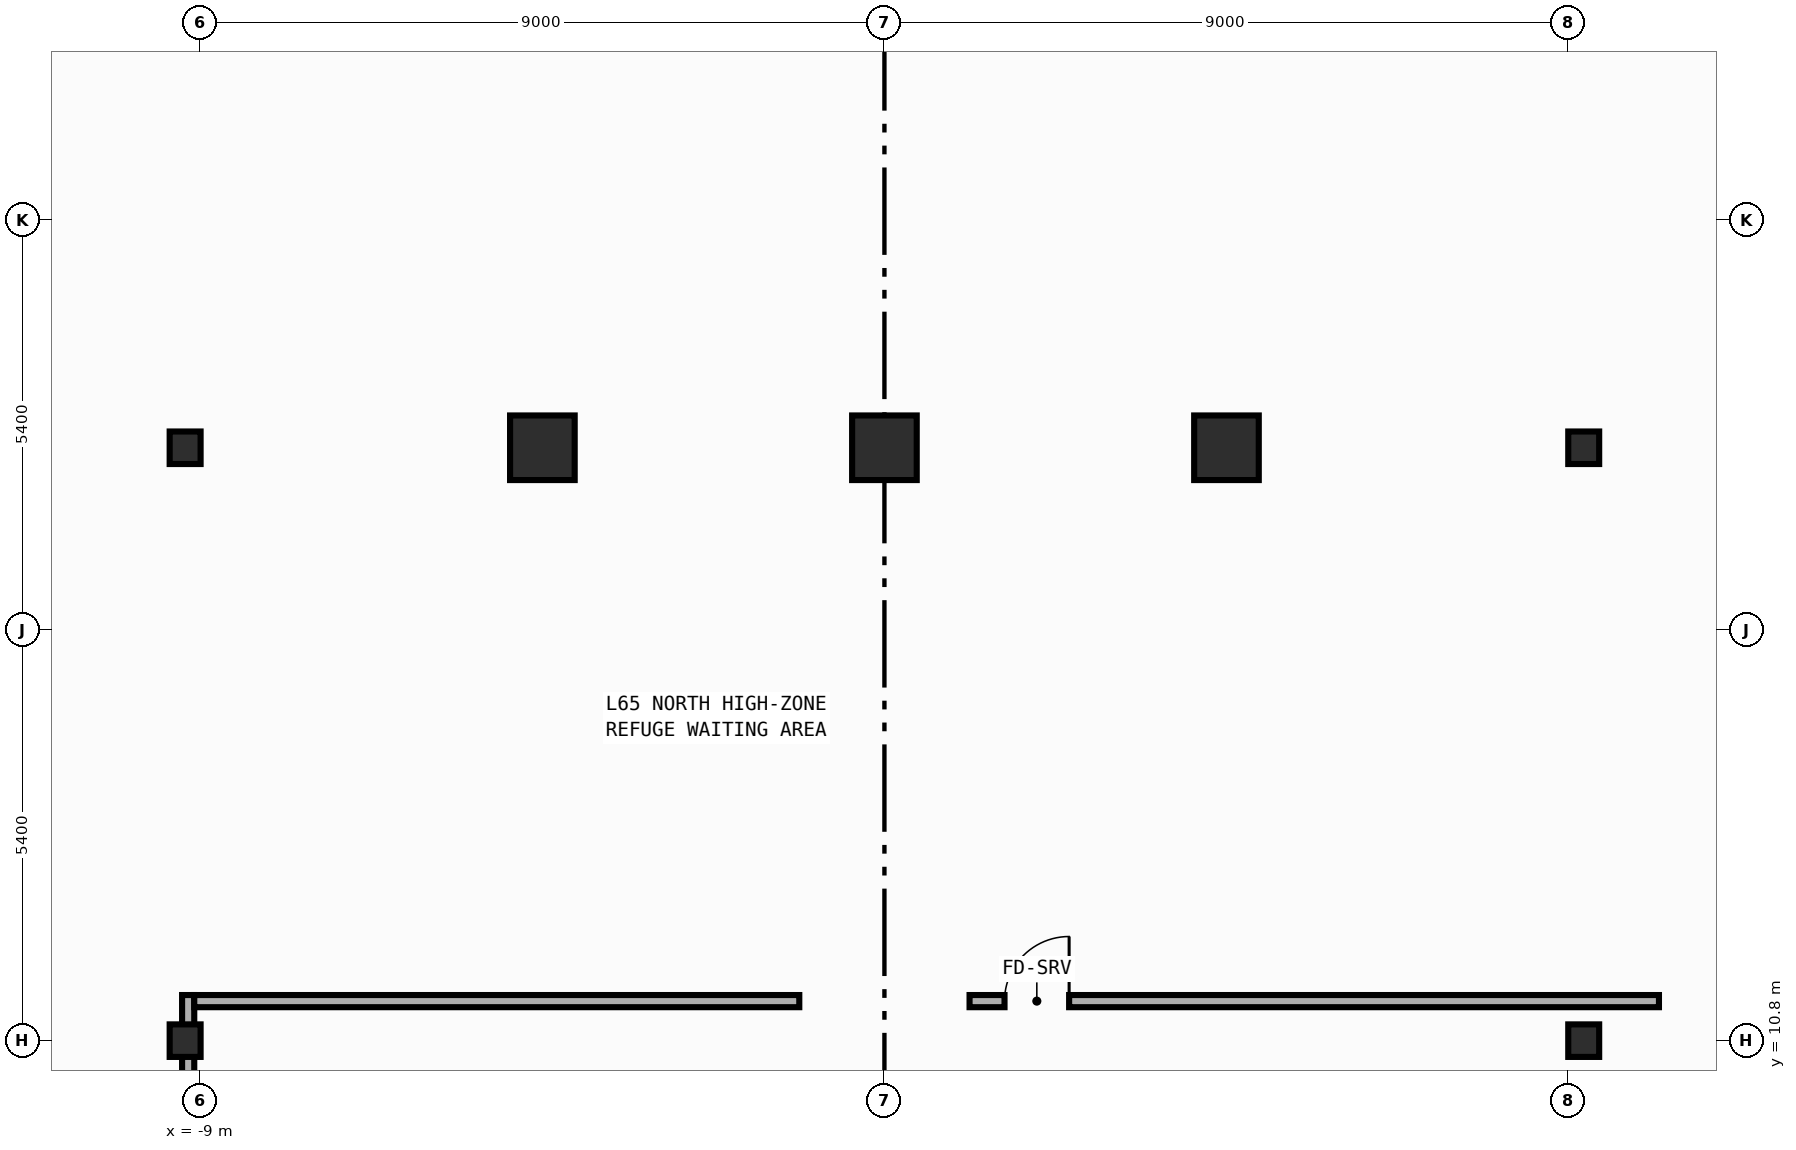
"""IFC4 building model, lengths in metres.
Left out: names, types, materials, properties, quantities, classifications, styles, units other than length and angle.
Written with IfcOpenShell. Run it as: python <this file> out.ifc"""

import sys

from ifc_helpers import new_model, si_unit, direction, frame, frame_2d, origin, origin_2d, place, context, subcontext, project, spatial, rectangle, i_section, extrude, element, fill, save


model = new_model("IFC4")
c1 = context("Model", 3, precision=1e-05, world=origin(), true_north=direction((0.0, 1.0)))
c2 = subcontext(c1, "Body", "Model", "MODEL_VIEW")
j1 = project(units=[si_unit("LENGTHUNIT", "METRE"), si_unit("PLANEANGLEUNIT", "RADIAN")], contexts=[c1])
p1 = place(None, origin())
s1 = spatial("IfcSite", under=j1, at=p1, CompositionType="ELEMENT")
p2 = place(p1, origin())
s2 = spatial("IfcBuilding", under=s1, at=p2, CompositionType="ELEMENT")
p3 = place(p2, frame((0.0, 0.0, 272.8)))
s3 = spatial("IfcBuildingStorey", under=s2, at=p3, CompositionType="ELEMENT", Elevation=272.8)
for number, where, z_axis, x_axis in (
    (1, (-9.2, 10.8, 0.0), (0.0, 0.0, 1.0), (1.0, 0.0, 0.0)),
    (2, (-9.2, 18.6, 0.0), (0.0, 0.0, 1.0), (1.0, 0.0, 0.0)),
    (3, (9.2, 10.8, 0.0), (0.0, 0.0, 1.0), (1.0, 0.0, 0.0)),
    (4, (9.2, 18.6, 0.0), (0.0, 0.0, 1.0), (1.0, 0.0, 0.0)),
):
    element("IfcColumn", number, at=place(p3, frame(where, z_axis=z_axis, x_axis=x_axis)), inside=s3, PredefinedType="COLUMN", context=c2, shape_type="SweptSolid", body=[
        extrude(i_section(OverallWidth=0.407, OverallDepth=0.428, WebThickness=0.02, FlangeThickness=0.035, FilletRadius=0.022, at=origin_2d()), origin(), (0.0, 0.0, 1.0), 4.8),
    ])
for number, where, z_axis, x_axis in (
    (5, (-4.5, 18.6, 0.0), (0.0, 0.0, 1.0), (1.0, 0.0, 0.0)),
    (6, (0.0, 18.6, 0.0), (0.0, 0.0, 1.0), (1.0, 0.0, 0.0)),
    (7, (4.5, 18.6, 0.0), (0.0, 0.0, 1.0), (1.0, 0.0, 0.0)),
):
    element("IfcColumn", number, at=place(p3, frame(where, z_axis=z_axis, x_axis=x_axis)), inside=s3, PredefinedType="COLUMN", context=c2, shape_type="SweptSolid", body=[
        extrude(rectangle(XDim=0.85, YDim=0.85, at=origin_2d()), origin(), (0.0, 0.0, 1.0), 4.8),
    ])
p4 = place(p3, frame((-9.16, 1.2, 0.0), z_axis=(0.0, 0.0, 1.0), x_axis=(0.0, 1.0, 0.0)))
e8 = element("IfcWall", 8, at=p4, inside=s3, PredefinedType="PARTITIONING", context=c2, shape_type="SweptSolid", body=[
    extrude(rectangle(XDim=10.2, YDim=0.16, at=frame_2d((5.1, 0.0))), origin(), (0.0, 0.0, 1.0), 3.64),
])
p5 = place(p4, frame((3.73, 0.0, 0.0)))
e9 = element("IfcOpeningElement", 9, at=p5, cuts=e8, PredefinedType="OPENING", context=c2, shape_type="SweptSolid", body=[
    extrude(rectangle(XDim=0.9, YDim=2.15, at=frame_2d((0.45, 1.075))), frame((0.0, 0.09, 0.0), z_axis=(0.0, -1.0, 0.0), x_axis=(1.0, 0.0, 0.0)), (0.0, 0.0, 1.0), 0.18),
])
p6 = place(p3, frame((-9.08, 11.32, 0.0), z_axis=(0.0, 0.0, 1.0), x_axis=(1.0, 0.0, 0.0)))
e10 = element("IfcWall", 10, at=p6, inside=s3, PredefinedType="PARTITIONING", context=c2, shape_type="SweptSolid", body=[
    extrude(rectangle(XDim=7.96, YDim=0.16, at=frame_2d((3.98, 0.0))), origin(), (0.0, 0.0, 1.0), 4.54),
])
p7 = place(p3, frame((1.12, 11.32, 0.0), z_axis=(0.0, 0.0, 1.0), x_axis=(1.0, 0.0, 0.0)))
e11 = element("IfcWall", 11, at=p7, inside=s3, PredefinedType="PARTITIONING", context=c2, shape_type="SweptSolid", body=[
    extrude(rectangle(XDim=9.07, YDim=0.16, at=frame_2d((4.535, 0.0))), origin(), (0.0, 0.0, 1.0), 4.54),
])
p8 = place(p7, frame((0.46, 0.0, 0.0)))
e12 = element("IfcOpeningElement", 12, at=p8, cuts=e11, PredefinedType="OPENING", context=c2, shape_type="SweptSolid", body=[
    extrude(rectangle(XDim=0.85, YDim=2.1, at=frame_2d((0.425, 1.05))), frame((0.0, 0.09, 0.0), z_axis=(0.0, -1.0, 0.0), x_axis=(1.0, 0.0, 0.0)), (0.0, 0.0, 1.0), 0.18),
])
p9 = place(p8, origin())
e13 = element("IfcDoor", 13, at=p9, inside=s3, OperationType="SINGLE_SWING_RIGHT", PredefinedType="DOOR", context=c2, shape_type="SweptSolid", body=[
    extrude(rectangle(XDim=0.85, YDim=2.1, at=frame_2d((0.425, 1.05))), frame((0.0, 0.025, 0.0), z_axis=(0.0, -1.0, 0.0), x_axis=(1.0, 0.0, 0.0)), (0.0, 0.0, 1.0), 0.05),
])
fill(e12, e13)
save(model, sys.argv[1])
